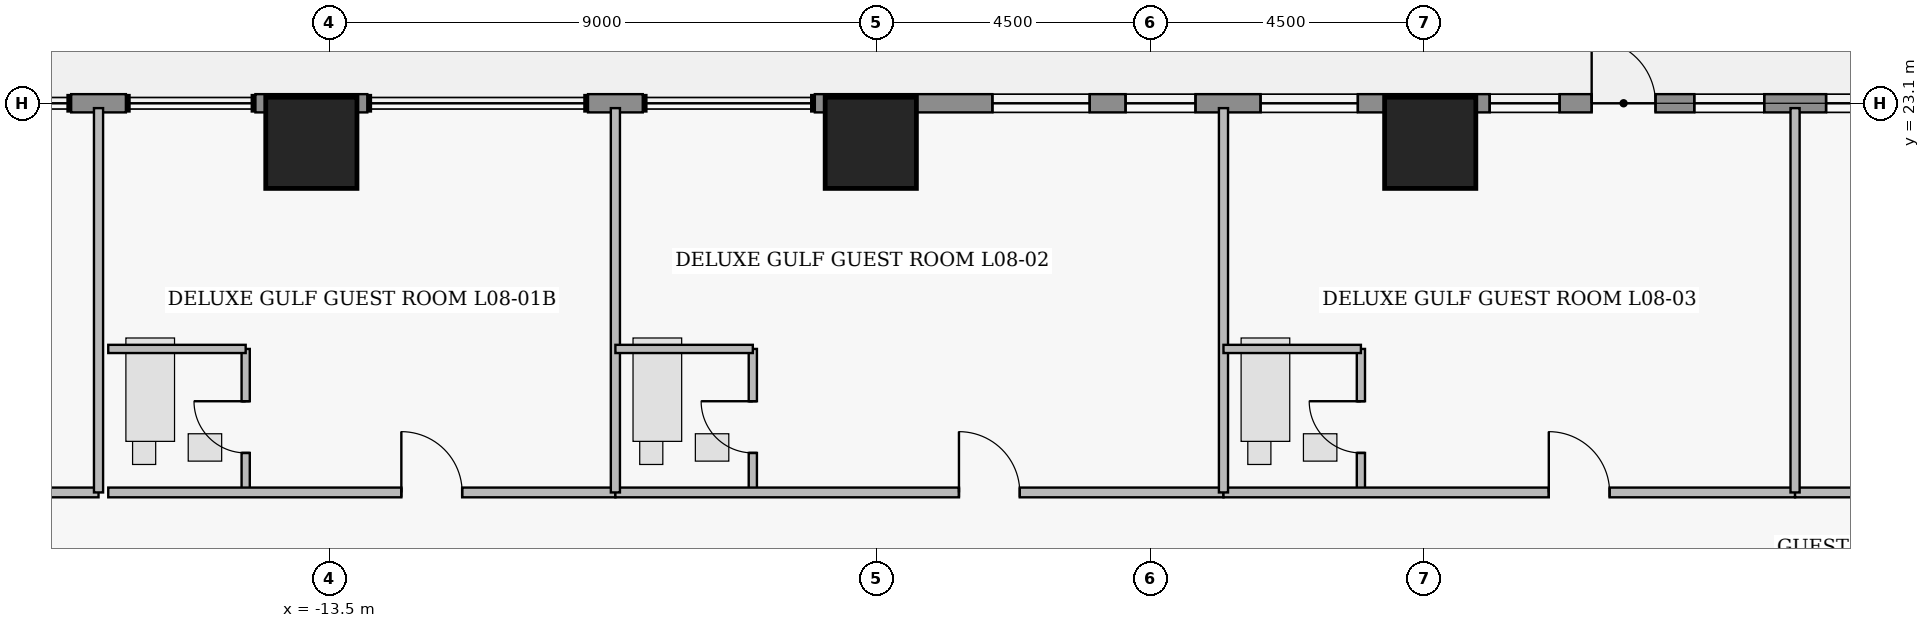
"""IFC4 building model, lengths in metres.
Left out: names, types, materials, properties, quantities, classifications, styles, units other than length and angle.
Written with IfcOpenShell. Run it as: python <this file> out.ifc"""

import sys

from ifc_helpers import new_model, si_unit, direction, frame, frame_2d, origin, origin_2d, place, context, subcontext, project, spatial, rectangle, extrude, element, fill, save


model = new_model("IFC4")
c1 = context("Model", 3, precision=1e-05, world=origin(), true_north=direction((0.0, 1.0)))
c2 = subcontext(c1, "Body", "Model", "MODEL_VIEW")
j1 = project(units=[si_unit("LENGTHUNIT", "METRE"), si_unit("PLANEANGLEUNIT", "RADIAN")], contexts=[c1])
p1 = place(None, origin())
s1 = spatial("IfcSite", under=j1, at=p1, CompositionType="ELEMENT")
p2 = place(p1, origin())
s2 = spatial("IfcBuilding", under=s1, at=p2, CompositionType="ELEMENT")
p3 = place(p2, frame((0.0, 0.0, 38.55)))
s3 = spatial("IfcBuildingStorey", under=s2, at=p3, CompositionType="ELEMENT", Elevation=38.55)
for number, where, z_axis, x_axis in (
    (1, (-13.8, 22.45, 0.0), (0.0, 0.0, 1.0), (1.0, 0.0, 0.0)),
    (2, (-4.6, 22.45, 0.0), (0.0, 0.0, 1.0), (1.0, 0.0, 0.0)),
    (3, (4.6, 22.45, 0.0), (0.0, 0.0, 1.0), (1.0, 0.0, 0.0)),
):
    element("IfcColumn", number, at=place(p3, frame(where, z_axis=z_axis, x_axis=x_axis)), inside=s3, PredefinedType="COLUMN", context=c2, shape_type="SweptSolid", body=[
        extrude(rectangle(XDim=1.5, YDim=1.5, at=origin_2d()), origin(), (0.0, 0.0, 1.0), 3.65),
    ])
p4 = place(p3, frame((-17.75, 23.1, 0.0), z_axis=(0.0, 0.0, 1.0), x_axis=(1.0, 0.0, 0.0)))
e4 = element("IfcWall", 4, at=p4, inside=s3, PredefinedType="STANDARD", context=c2, shape_type="SweptSolid", body=[
    extrude(rectangle(XDim=0.9, YDim=0.3, at=frame_2d((0.45, 0.0))), origin(), (0.0, 0.0, 1.0), 3.43),
])
p5 = place(p3, frame((-14.72, 23.1, 0.0), z_axis=(0.0, 0.0, 1.0), x_axis=(1.0, 0.0, 0.0)))
e5 = element("IfcWall", 5, at=p5, inside=s3, PredefinedType="STANDARD", context=c2, shape_type="SweptSolid", body=[
    extrude(rectangle(XDim=1.84, YDim=0.3, at=frame_2d((0.92, 0.0))), origin(), (0.0, 0.0, 1.0), 3.43),
])
p6 = place(p3, frame((-9.25, 23.1, 0.0), z_axis=(0.0, 0.0, 1.0), x_axis=(1.0, 0.0, 0.0)))
e6 = element("IfcWall", 6, at=p6, inside=s3, PredefinedType="STANDARD", context=c2, shape_type="SweptSolid", body=[
    extrude(rectangle(XDim=0.9, YDim=0.3, at=frame_2d((0.45, 0.0))), origin(), (0.0, 0.0, 1.0), 3.43),
])
p7 = place(p3, frame((-5.52, 23.1, 0.0), z_axis=(0.0, 0.0, 1.0), x_axis=(1.0, 0.0, 0.0)))
e7 = element("IfcWall", 7, at=p7, inside=s3, PredefinedType="STANDARD", context=c2, shape_type="SweptSolid", body=[
    extrude(rectangle(XDim=20.24, YDim=0.3, at=frame_2d((10.12, 0.0))), origin(), (0.0, 0.0, 1.0), 3.43),
])
p8 = place(p7, frame((12.775, 0.0, 0.0)))
e8 = element("IfcOpeningElement", 8, at=p8, cuts=e7, PredefinedType="OPENING", context=c2, shape_type="SweptSolid", body=[
    extrude(rectangle(XDim=1.05, YDim=2.2, at=frame_2d((0.525, 1.1))), frame((0.0, 0.16, 0.0), z_axis=(0.0, -1.0, 0.0), x_axis=(1.0, 0.0, 0.0)), (0.0, 0.0, 1.0), 0.32),
])
p9 = place(p7, frame((2.92, 0.0, 0.85)))
e9 = element("IfcOpeningElement", 9, at=p9, cuts=e7, PredefinedType="OPENING", context=c2, shape_type="SweptSolid", body=[
    extrude(rectangle(XDim=1.6, YDim=1.8, at=frame_2d((0.8, 0.9))), frame((0.0, 0.16, 0.0), z_axis=(0.0, -1.0, 0.0), x_axis=(1.0, 0.0, 0.0)), (0.0, 0.0, 1.0), 0.32),
])
p10 = place(p7, frame((5.11, 0.0, 0.95)))
e10 = element("IfcOpeningElement", 10, at=p10, cuts=e7, PredefinedType="OPENING", context=c2, shape_type="SweptSolid", body=[
    extrude(rectangle(XDim=1.15, YDim=1.55, at=frame_2d((0.575, 0.775))), frame((0.0, 0.16, 0.0), z_axis=(0.0, -1.0, 0.0), x_axis=(1.0, 0.0, 0.0)), (0.0, 0.0, 1.0), 0.32),
])
p11 = place(p7, frame((7.33, 0.0, 0.85)))
e11 = element("IfcOpeningElement", 11, at=p11, cuts=e7, PredefinedType="OPENING", context=c2, shape_type="SweptSolid", body=[
    extrude(rectangle(XDim=1.6, YDim=1.8, at=frame_2d((0.8, 0.9))), frame((0.0, 0.16, 0.0), z_axis=(0.0, -1.0, 0.0), x_axis=(1.0, 0.0, 0.0)), (0.0, 0.0, 1.0), 0.32),
])
p12 = place(p7, frame((11.097, 0.0, 0.95)))
e12 = element("IfcOpeningElement", 12, at=p12, cuts=e7, PredefinedType="OPENING", context=c2, shape_type="SweptSolid", body=[
    extrude(rectangle(XDim=1.15, YDim=1.55, at=frame_2d((0.575, 0.775))), frame((0.0, 0.16, 0.0), z_axis=(0.0, -1.0, 0.0), x_axis=(1.0, 0.0, 0.0)), (0.0, 0.0, 1.0), 0.32),
])
p13 = place(p7, frame((14.462, 0.0, 0.95)))
e13 = element("IfcOpeningElement", 13, at=p13, cuts=e7, PredefinedType="OPENING", context=c2, shape_type="SweptSolid", body=[
    extrude(rectangle(XDim=1.15, YDim=1.55, at=frame_2d((0.575, 0.775))), frame((0.0, 0.16, 0.0), z_axis=(0.0, -1.0, 0.0), x_axis=(1.0, 0.0, 0.0)), (0.0, 0.0, 1.0), 0.32),
])
p14 = place(p7, frame((16.63, 0.0, 0.85)))
e14 = element("IfcOpeningElement", 14, at=p14, cuts=e7, PredefinedType="OPENING", context=c2, shape_type="SweptSolid", body=[
    extrude(rectangle(XDim=1.6, YDim=1.8, at=frame_2d((0.8, 0.9))), frame((0.0, 0.16, 0.0), z_axis=(0.0, -1.0, 0.0), x_axis=(1.0, 0.0, 0.0)), (0.0, 0.0, 1.0), 0.32),
])
p15 = place(p3, frame((-25.64, 16.7, 0.0), z_axis=(0.0, 0.0, 1.0), x_axis=(1.0, 0.0, 0.0)))
e15 = element("IfcWall", 15, at=p15, inside=s3, PredefinedType="PARTITIONING", context=c2, shape_type="SweptSolid", body=[
    extrude(rectangle(XDim=8.34, YDim=0.16, at=frame_2d((4.17, 0.0))), origin(), (0.0, 0.0, 1.0), 3.43),
])
p16 = place(p15, frame((4.82, 0.0, 0.0)))
e16 = element("IfcOpeningElement", 16, at=p16, cuts=e15, PredefinedType="OPENING", context=c2, shape_type="SweptSolid", body=[
    extrude(rectangle(XDim=1.0, YDim=2.15, at=frame_2d((0.5, 1.075))), frame((0.0, 0.09, 0.0), z_axis=(0.0, -1.0, 0.0), x_axis=(1.0, 0.0, 0.0)), (0.0, 0.0, 1.0), 0.18),
])
p17 = place(p3, frame((-14.88, 16.7, 0.0), z_axis=(0.0, 0.0, 1.0), x_axis=(0.0, 1.0, 0.0)))
e17 = element("IfcWall", 17, at=p17, inside=s3, PredefinedType="PLUMBINGWALL", context=c2, shape_type="SweptSolid", body=[
    extrude(rectangle(XDim=2.36, YDim=0.135, at=frame_2d((1.18, 0.0))), origin(), (0.0, 0.0, 1.0), 3.43),
])
p18 = place(p17, frame((0.65, 0.0, 0.0)))
e18 = element("IfcOpeningElement", 18, at=p18, cuts=e17, PredefinedType="OPENING", context=c2, shape_type="SweptSolid", body=[
    extrude(rectangle(XDim=0.85, YDim=2.1, at=frame_2d((0.425, 1.05))), frame((0.0, 0.077, 0.0), z_axis=(0.0, -1.0, 0.0), x_axis=(1.0, 0.0, 0.0)), (0.0, 0.0, 1.0), 0.155),
])
p19 = place(p3, frame((-17.14, 16.7, 0.0), z_axis=(0.0, 0.0, 1.0), x_axis=(1.0, 0.0, 0.0)))
e19 = element("IfcWall", 19, at=p19, inside=s3, PredefinedType="PARTITIONING", context=c2, shape_type="SweptSolid", body=[
    extrude(rectangle(XDim=8.34, YDim=0.16, at=frame_2d((4.17, 0.0))), origin(), (0.0, 0.0, 1.0), 2.973),
])
p20 = place(p19, frame((4.82, 0.0, 0.0)))
e20 = element("IfcOpeningElement", 20, at=p20, cuts=e19, PredefinedType="OPENING", context=c2, shape_type="SweptSolid", body=[
    extrude(rectangle(XDim=1.0, YDim=2.15, at=frame_2d((0.5, 1.075))), frame((0.0, 0.09, 0.0), z_axis=(0.0, -1.0, 0.0), x_axis=(1.0, 0.0, 0.0)), (0.0, 0.0, 1.0), 0.18),
])
p21 = place(p3, frame((-6.54, 16.7, 0.0), z_axis=(0.0, 0.0, 1.0), x_axis=(0.0, 1.0, 0.0)))
e21 = element("IfcWall", 21, at=p21, inside=s3, PredefinedType="PLUMBINGWALL", context=c2, shape_type="SweptSolid", body=[
    extrude(rectangle(XDim=2.36, YDim=0.135, at=frame_2d((1.18, 0.0))), origin(), (0.0, 0.0, 1.0), 3.43),
])
p22 = place(p21, frame((0.65, 0.0, 0.0)))
e22 = element("IfcOpeningElement", 22, at=p22, cuts=e21, PredefinedType="OPENING", context=c2, shape_type="SweptSolid", body=[
    extrude(rectangle(XDim=0.85, YDim=2.1, at=frame_2d((0.425, 1.05))), frame((0.0, 0.077, 0.0), z_axis=(0.0, -1.0, 0.0), x_axis=(1.0, 0.0, 0.0)), (0.0, 0.0, 1.0), 0.155),
])
p23 = place(p3, frame((-8.8, 16.7, 0.0), z_axis=(0.0, 0.0, 1.0), x_axis=(1.0, 0.0, 0.0)))
e23 = element("IfcWall", 23, at=p23, inside=s3, PredefinedType="PARTITIONING", context=c2, shape_type="SweptSolid", body=[
    extrude(rectangle(XDim=10.0, YDim=0.16, at=frame_2d((5.0, 0.0))), origin(), (0.0, 0.0, 1.0), 2.973),
])
p24 = place(p23, frame((5.65, 0.0, 0.0)))
e24 = element("IfcOpeningElement", 24, at=p24, cuts=e23, PredefinedType="OPENING", context=c2, shape_type="SweptSolid", body=[
    extrude(rectangle(XDim=1.0, YDim=2.15, at=frame_2d((0.5, 1.075))), frame((0.0, 0.09, 0.0), z_axis=(0.0, -1.0, 0.0), x_axis=(1.0, 0.0, 0.0)), (0.0, 0.0, 1.0), 0.18),
])
p25 = place(p3, frame((3.46, 16.7, 0.0), z_axis=(0.0, 0.0, 1.0), x_axis=(0.0, 1.0, 0.0)))
e25 = element("IfcWall", 25, at=p25, inside=s3, PredefinedType="PLUMBINGWALL", context=c2, shape_type="SweptSolid", body=[
    extrude(rectangle(XDim=2.36, YDim=0.135, at=frame_2d((1.18, 0.0))), origin(), (0.0, 0.0, 1.0), 3.43),
])
p26 = place(p25, frame((0.65, 0.0, 0.0)))
e26 = element("IfcOpeningElement", 26, at=p26, cuts=e25, PredefinedType="OPENING", context=c2, shape_type="SweptSolid", body=[
    extrude(rectangle(XDim=0.85, YDim=2.1, at=frame_2d((0.425, 1.05))), frame((0.0, 0.077, 0.0), z_axis=(0.0, -1.0, 0.0), x_axis=(1.0, 0.0, 0.0)), (0.0, 0.0, 1.0), 0.155),
])
p27 = place(p3, frame((1.2, 16.7, 0.0), z_axis=(0.0, 0.0, 1.0), x_axis=(1.0, 0.0, 0.0)))
e27 = element("IfcWall", 27, at=p27, inside=s3, PredefinedType="PARTITIONING", context=c2, shape_type="SweptSolid", body=[
    extrude(rectangle(XDim=9.4, YDim=0.16, at=frame_2d((4.7, 0.0))), origin(), (0.0, 0.0, 1.0), 2.973),
])
p28 = place(p27, frame((5.35, 0.0, 0.0)))
e28 = element("IfcOpeningElement", 28, at=p28, cuts=e27, PredefinedType="OPENING", context=c2, shape_type="SweptSolid", body=[
    extrude(rectangle(XDim=1.0, YDim=2.15, at=frame_2d((0.5, 1.075))), frame((0.0, 0.09, 0.0), z_axis=(0.0, -1.0, 0.0), x_axis=(1.0, 0.0, 0.0)), (0.0, 0.0, 1.0), 0.18),
])
p29 = place(p3, frame((10.6, 16.7, 0.0), z_axis=(0.0, 0.0, 1.0), x_axis=(1.0, 0.0, 0.0)))
e29 = element("IfcWall", 29, at=p29, inside=s3, PredefinedType="PARTITIONING", context=c2, shape_type="SweptSolid", body=[
    extrude(rectangle(XDim=15.04, YDim=0.16, at=frame_2d((7.52, 0.0))), origin(), (0.0, 0.0, 1.0), 2.973),
])
p30 = place(p29, frame((6.98, 0.0, 0.0)))
e30 = element("IfcOpeningElement", 30, at=p30, cuts=e29, PredefinedType="OPENING", context=c2, shape_type="SweptSolid", body=[
    extrude(rectangle(XDim=1.08, YDim=2.18, at=frame_2d((0.54, 1.09))), frame((0.0, 0.09, 0.0), z_axis=(0.0, -1.0, 0.0), x_axis=(1.0, 0.0, 0.0)), (0.0, 0.0, 1.0), 0.18),
])
p31 = place(p3, frame((-17.3, 16.7, 0.0), z_axis=(0.0, 0.0, 1.0), x_axis=(0.0, 1.0, 0.0)))
e31 = element("IfcWall", 31, at=p31, inside=s3, PredefinedType="PARTITIONING", context=c2, shape_type="SweptSolid", body=[
    extrude(rectangle(XDim=6.32, YDim=0.15, at=frame_2d((3.16, 0.0))), origin(), (0.0, 0.0, 1.0), 3.43),
])
p32 = place(p3, frame((-17.14, 19.06, 0.0), z_axis=(0.0, 0.0, 1.0), x_axis=(1.0, 0.0, 0.0)))
e32 = element("IfcWall", 32, at=p32, inside=s3, PredefinedType="PLUMBINGWALL", context=c2, shape_type="SweptSolid", body=[
    extrude(rectangle(XDim=2.26, YDim=0.135, at=frame_2d((1.13, 0.0))), origin(), (0.0, 0.0, 1.0), 3.43),
])
p33 = place(p3, frame((-8.8, 16.7, 0.0), z_axis=(0.0, 0.0, 1.0), x_axis=(0.0, 1.0, 0.0)))
e33 = element("IfcWall", 33, at=p33, inside=s3, PredefinedType="PARTITIONING", context=c2, shape_type="SweptSolid", body=[
    extrude(rectangle(XDim=6.32, YDim=0.15, at=frame_2d((3.16, 0.0))), origin(), (0.0, 0.0, 1.0), 3.43),
])
p34 = place(p3, frame((-8.8, 19.06, 0.0), z_axis=(0.0, 0.0, 1.0), x_axis=(1.0, 0.0, 0.0)))
e34 = element("IfcWall", 34, at=p34, inside=s3, PredefinedType="PLUMBINGWALL", context=c2, shape_type="SweptSolid", body=[
    extrude(rectangle(XDim=2.26, YDim=0.135, at=frame_2d((1.13, 0.0))), origin(), (0.0, 0.0, 1.0), 2.973),
])
p35 = place(p3, frame((1.2, 16.7, 0.0), z_axis=(0.0, 0.0, 1.0), x_axis=(0.0, 1.0, 0.0)))
e35 = element("IfcWall", 35, at=p35, inside=s3, PredefinedType="PARTITIONING", context=c2, shape_type="SweptSolid", body=[
    extrude(rectangle(XDim=6.32, YDim=0.15, at=frame_2d((3.16, 0.0))), origin(), (0.0, 0.0, 1.0), 3.43),
])
p36 = place(p3, frame((1.2, 19.06, 0.0), z_axis=(0.0, 0.0, 1.0), x_axis=(1.0, 0.0, 0.0)))
e36 = element("IfcWall", 36, at=p36, inside=s3, PredefinedType="PLUMBINGWALL", context=c2, shape_type="SweptSolid", body=[
    extrude(rectangle(XDim=2.26, YDim=0.135, at=frame_2d((1.13, 0.0))), origin(), (0.0, 0.0, 1.0), 2.973),
])
p37 = place(p3, frame((10.6, 16.7, 0.0), z_axis=(0.0, 0.0, 1.0), x_axis=(0.0, 1.0, 0.0)))
e37 = element("IfcWall", 37, at=p37, inside=s3, PredefinedType="PARTITIONING", context=c2, shape_type="SweptSolid", body=[
    extrude(rectangle(XDim=6.32, YDim=0.15, at=frame_2d((3.16, 0.0))), origin(), (0.0, 0.0, 1.0), 3.43),
])
p38 = place(p8, origin())
e38 = element("IfcDoor", 38, at=p38, inside=s3, OperationType="SINGLE_SWING_LEFT", PredefinedType="DOOR", context=c2, shape_type="SweptSolid", body=[
    extrude(rectangle(XDim=1.05, YDim=2.2, at=frame_2d((0.525, 1.1))), frame((0.0, 0.025, 0.0), z_axis=(0.0, -1.0, 0.0), x_axis=(1.0, 0.0, 0.0)), (0.0, 0.0, 1.0), 0.05),
])
fill(e8, e38)
p39 = place(p9, origin())
e39 = element("IfcWindow", 39, at=p39, inside=s3, PartitioningType="SINGLE_PANEL", PredefinedType="WINDOW", context=c2, shape_type="SweptSolid", body=[
    extrude(rectangle(XDim=1.6, YDim=1.8, at=frame_2d((0.8, 0.9))), frame((0.0, 0.03, 0.0), z_axis=(0.0, -1.0, 0.0), x_axis=(1.0, 0.0, 0.0)), (0.0, 0.0, 1.0), 0.06),
])
fill(e9, e39)
p40 = place(p10, origin())
e40 = element("IfcWindow", 40, at=p40, inside=s3, PartitioningType="SINGLE_PANEL", PredefinedType="WINDOW", context=c2, shape_type="SweptSolid", body=[
    extrude(rectangle(XDim=1.15, YDim=1.55, at=frame_2d((0.575, 0.775))), frame((0.0, 0.03, 0.0), z_axis=(0.0, -1.0, 0.0), x_axis=(1.0, 0.0, 0.0)), (0.0, 0.0, 1.0), 0.06),
])
fill(e10, e40)
p41 = place(p11, origin())
e41 = element("IfcWindow", 41, at=p41, inside=s3, PartitioningType="SINGLE_PANEL", PredefinedType="WINDOW", context=c2, shape_type="SweptSolid", body=[
    extrude(rectangle(XDim=1.6, YDim=1.8, at=frame_2d((0.8, 0.9))), frame((0.0, 0.03, 0.0), z_axis=(0.0, -1.0, 0.0), x_axis=(1.0, 0.0, 0.0)), (0.0, 0.0, 1.0), 0.06),
])
fill(e11, e41)
p42 = place(p12, origin())
e42 = element("IfcWindow", 42, at=p42, inside=s3, PartitioningType="SINGLE_PANEL", PredefinedType="WINDOW", context=c2, shape_type="SweptSolid", body=[
    extrude(rectangle(XDim=1.15, YDim=1.55, at=frame_2d((0.575, 0.775))), frame((0.0, 0.03, 0.0), z_axis=(0.0, -1.0, 0.0), x_axis=(1.0, 0.0, 0.0)), (0.0, 0.0, 1.0), 0.06),
])
fill(e12, e42)
p43 = place(p13, origin())
e43 = element("IfcWindow", 43, at=p43, inside=s3, PartitioningType="SINGLE_PANEL", PredefinedType="WINDOW", context=c2, shape_type="SweptSolid", body=[
    extrude(rectangle(XDim=1.15, YDim=1.55, at=frame_2d((0.575, 0.775))), frame((0.0, 0.03, 0.0), z_axis=(0.0, -1.0, 0.0), x_axis=(1.0, 0.0, 0.0)), (0.0, 0.0, 1.0), 0.06),
])
fill(e13, e43)
p44 = place(p14, origin())
e44 = element("IfcWindow", 44, at=p44, inside=s3, PartitioningType="SINGLE_PANEL", PredefinedType="WINDOW", context=c2, shape_type="SweptSolid", body=[
    extrude(rectangle(XDim=1.6, YDim=1.8, at=frame_2d((0.8, 0.9))), frame((0.0, 0.03, 0.0), z_axis=(0.0, -1.0, 0.0), x_axis=(1.0, 0.0, 0.0)), (0.0, 0.0, 1.0), 0.06),
])
fill(e14, e44)
p45 = place(p18, origin())
e45 = element("IfcDoor", 45, at=p45, inside=s3, OperationType="SINGLE_SWING_RIGHT", PredefinedType="DOOR", context=c2, shape_type="SweptSolid", body=[
    extrude(rectangle(XDim=0.85, YDim=2.1, at=frame_2d((0.425, 1.05))), frame((0.0, 0.025, 0.0), z_axis=(0.0, -1.0, 0.0), x_axis=(1.0, 0.0, 0.0)), (0.0, 0.0, 1.0), 0.05),
])
fill(e18, e45)
p46 = place(p20, origin())
e46 = element("IfcDoor", 46, at=p46, inside=s3, OperationType="SINGLE_SWING_LEFT", PredefinedType="DOOR", context=c2, shape_type="SweptSolid", body=[
    extrude(rectangle(XDim=1.0, YDim=2.15, at=frame_2d((0.5, 1.075))), frame((0.0, 0.025, 0.0), z_axis=(0.0, -1.0, 0.0), x_axis=(1.0, 0.0, 0.0)), (0.0, 0.0, 1.0), 0.05),
])
fill(e20, e46)
p47 = place(p22, origin())
e47 = element("IfcDoor", 47, at=p47, inside=s3, OperationType="SINGLE_SWING_RIGHT", PredefinedType="DOOR", context=c2, shape_type="SweptSolid", body=[
    extrude(rectangle(XDim=0.85, YDim=2.1, at=frame_2d((0.425, 1.05))), frame((0.0, 0.025, 0.0), z_axis=(0.0, -1.0, 0.0), x_axis=(1.0, 0.0, 0.0)), (0.0, 0.0, 1.0), 0.05),
])
fill(e22, e47)
p48 = place(p24, origin())
e48 = element("IfcDoor", 48, at=p48, inside=s3, OperationType="SINGLE_SWING_LEFT", PredefinedType="DOOR", context=c2, shape_type="SweptSolid", body=[
    extrude(rectangle(XDim=1.0, YDim=2.15, at=frame_2d((0.5, 1.075))), frame((0.0, 0.025, 0.0), z_axis=(0.0, -1.0, 0.0), x_axis=(1.0, 0.0, 0.0)), (0.0, 0.0, 1.0), 0.05),
])
fill(e24, e48)
p49 = place(p26, origin())
e49 = element("IfcDoor", 49, at=p49, inside=s3, OperationType="SINGLE_SWING_RIGHT", PredefinedType="DOOR", context=c2, shape_type="SweptSolid", body=[
    extrude(rectangle(XDim=0.85, YDim=2.1, at=frame_2d((0.425, 1.05))), frame((0.0, 0.025, 0.0), z_axis=(0.0, -1.0, 0.0), x_axis=(1.0, 0.0, 0.0)), (0.0, 0.0, 1.0), 0.05),
])
fill(e26, e49)
p50 = place(p28, origin())
e50 = element("IfcDoor", 50, at=p50, inside=s3, OperationType="SINGLE_SWING_LEFT", PredefinedType="DOOR", context=c2, shape_type="SweptSolid", body=[
    extrude(rectangle(XDim=1.0, YDim=2.15, at=frame_2d((0.5, 1.075))), frame((0.0, 0.025, 0.0), z_axis=(0.0, -1.0, 0.0), x_axis=(1.0, 0.0, 0.0)), (0.0, 0.0, 1.0), 0.05),
])
fill(e28, e50)
save(model, sys.argv[1])
